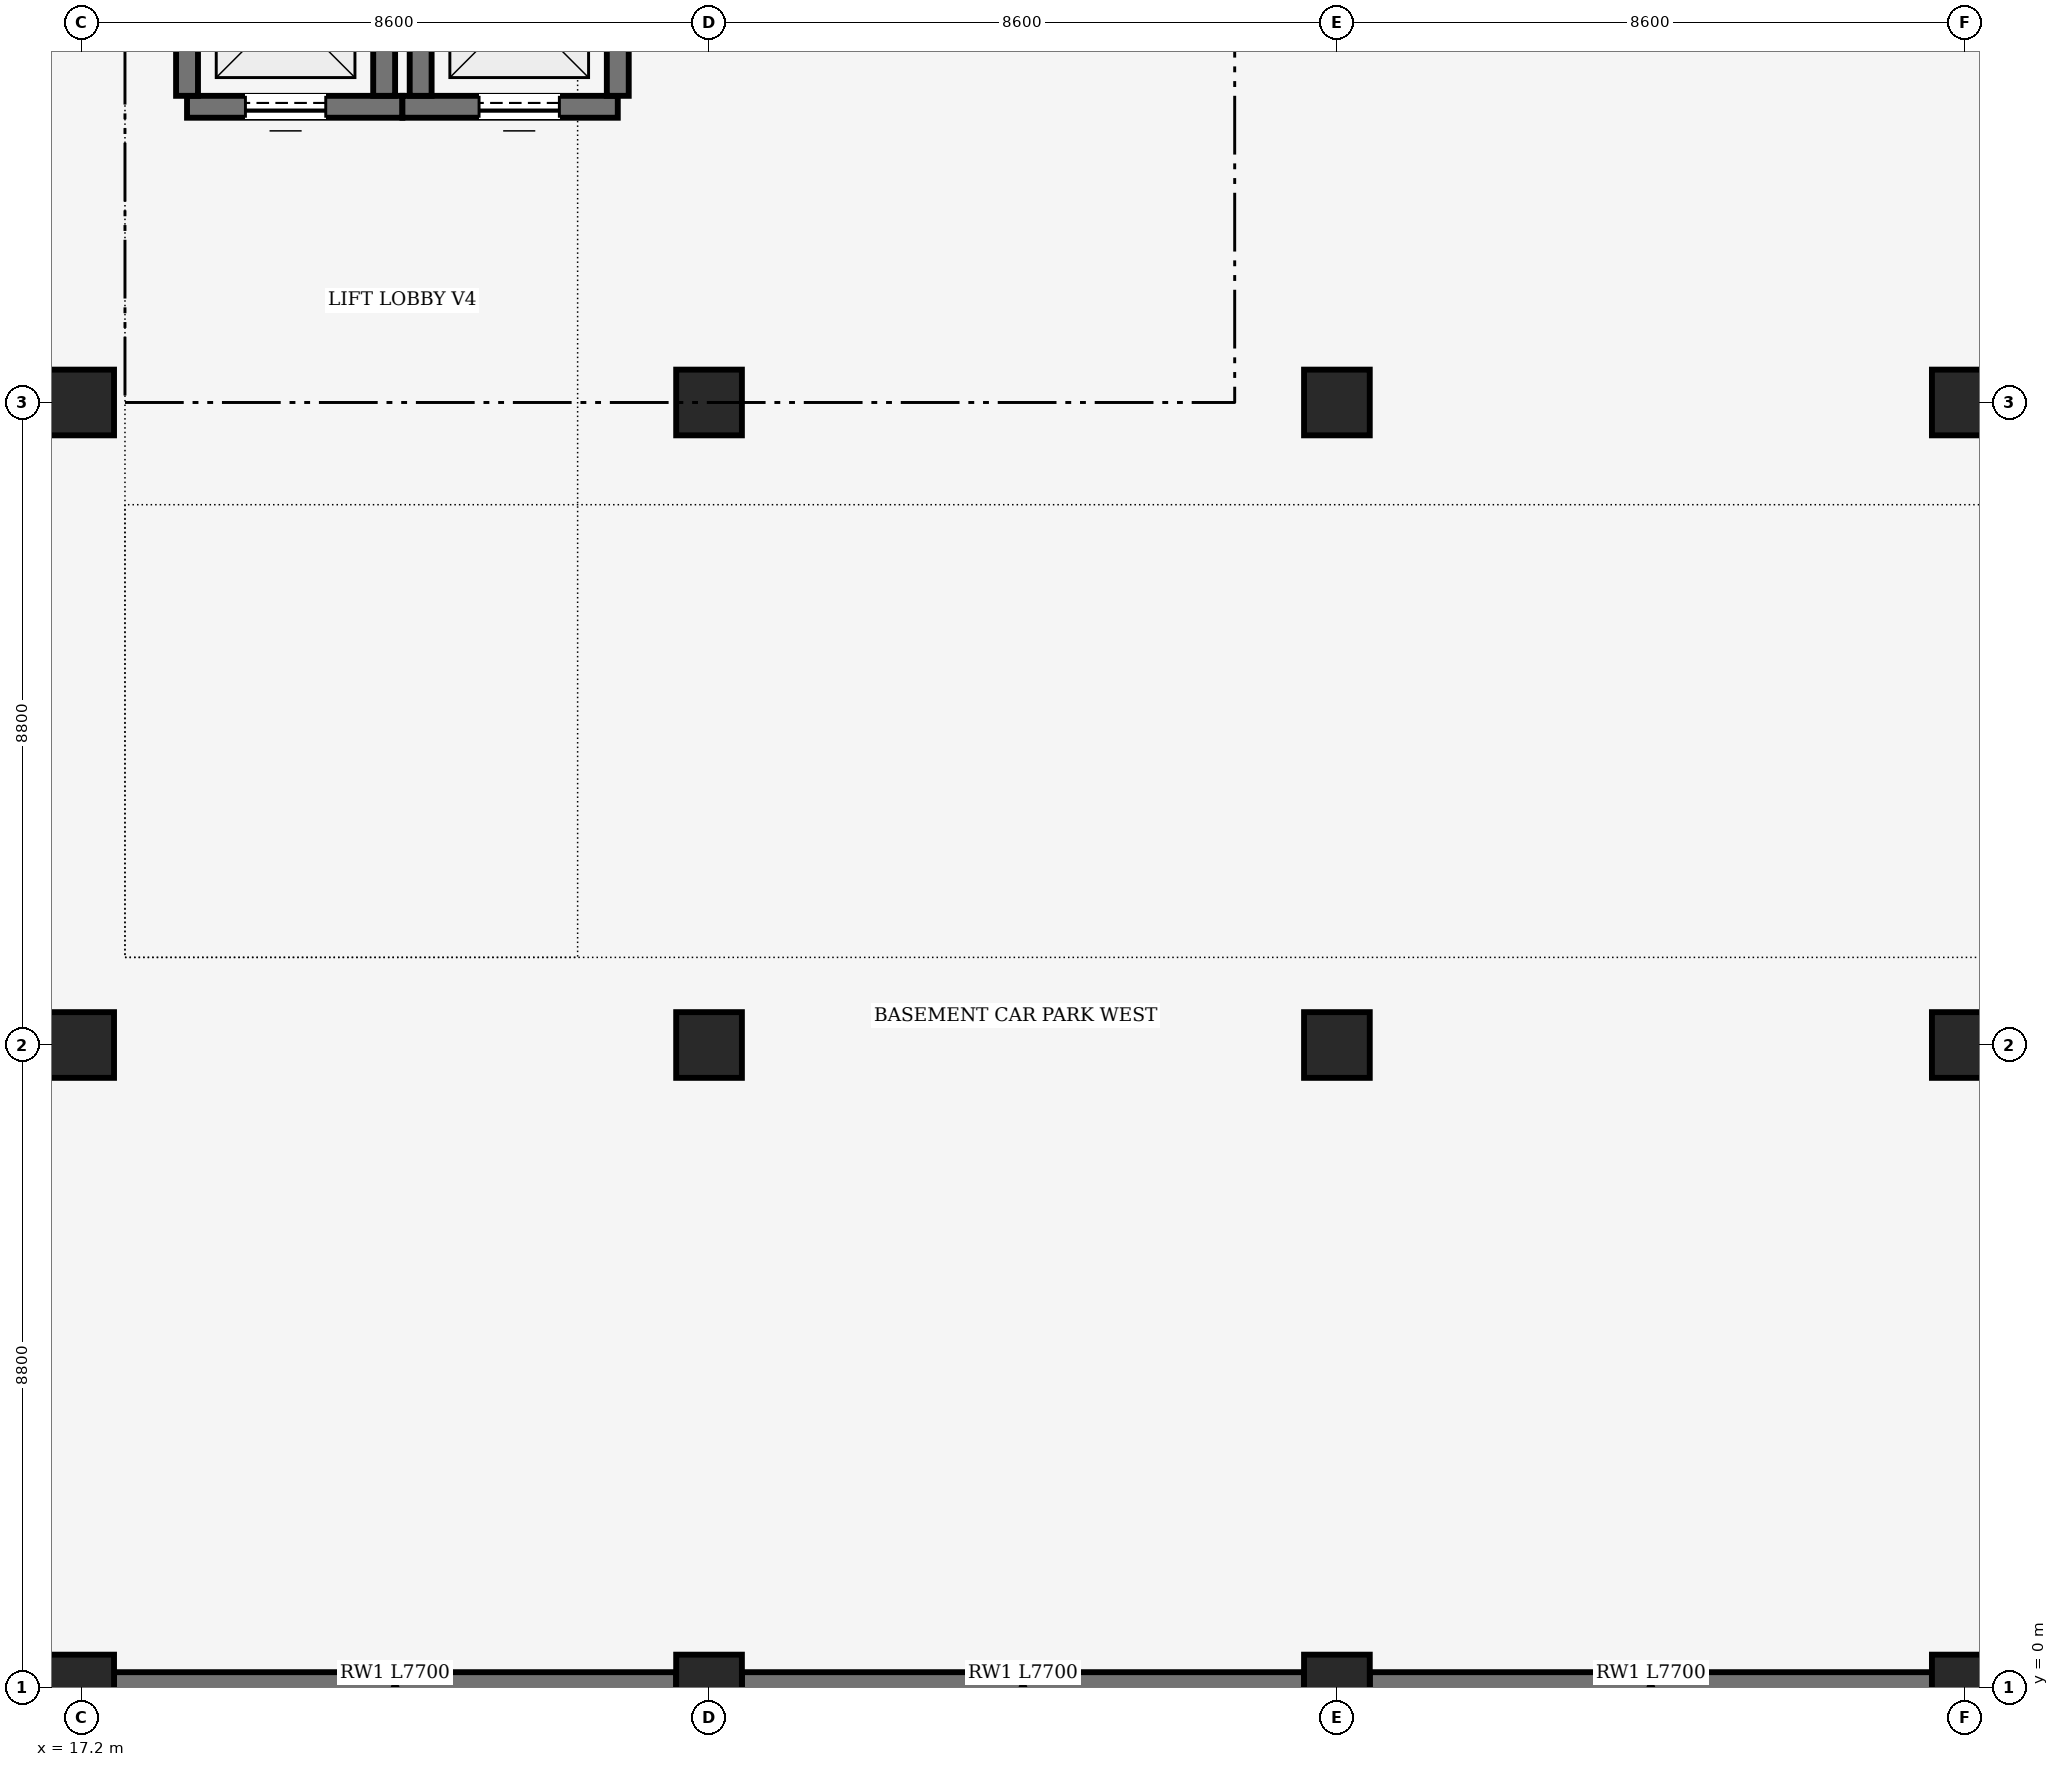
"""IFC4 building model, lengths in metres.
Left out: names, types, materials, properties, quantities, classifications, styles, units other than length and angle.
Written with IfcOpenShell. Run it as: python <this file> out.ifc"""

import sys

from ifc_helpers import new_model, si_unit, direction, frame, frame_2d, origin, origin_2d, place, context, subcontext, project, spatial, rectangle, extrude, element, fill, save


model = new_model("IFC4")
c1 = context("Model", 3, precision=1e-05, world=origin(), true_north=direction((0.0, 1.0)))
c2 = subcontext(c1, "Body", "Model", "MODEL_VIEW")
j1 = project(units=[si_unit("LENGTHUNIT", "METRE"), si_unit("PLANEANGLEUNIT", "RADIAN")], contexts=[c1])
p1 = place(None, origin())
s1 = spatial("IfcSite", under=j1, at=p1, CompositionType="ELEMENT")
p2 = place(p1, origin())
s2 = spatial("IfcBuilding", under=s1, at=p2, CompositionType="ELEMENT")
p3 = place(p2, frame((0.0, 0.0, -4.2)))
s3 = spatial("IfcBuildingStorey", under=s2, at=p3, CompositionType="ELEMENT", Elevation=-4.2)
for number, where, z_axis, x_axis in (
    (1, (17.2, 0.0, 0.0), (0.0, 0.0, 1.0), (1.0, 0.0, 0.0)),
    (2, (17.2, 8.8, 0.0), (0.0, 0.0, 1.0), (1.0, 0.0, 0.0)),
    (3, (17.2, 17.6, 0.0), (0.0, 0.0, 1.0), (1.0, 0.0, 0.0)),
    (4, (25.8, 0.0, 0.0), (0.0, 0.0, 1.0), (1.0, 0.0, 0.0)),
    (5, (25.8, 8.8, 0.0), (0.0, 0.0, 1.0), (1.0, 0.0, 0.0)),
    (6, (25.8, 17.6, 0.0), (0.0, 0.0, 1.0), (1.0, 0.0, 0.0)),
    (7, (34.4, 0.0, 0.0), (0.0, 0.0, 1.0), (1.0, 0.0, 0.0)),
    (8, (34.4, 8.8, 0.0), (0.0, 0.0, 1.0), (1.0, 0.0, 0.0)),
    (9, (34.4, 17.6, 0.0), (0.0, 0.0, 1.0), (1.0, 0.0, 0.0)),
    (10, (43.0, 0.0, 0.0), (0.0, 0.0, 1.0), (1.0, 0.0, 0.0)),
    (11, (43.0, 8.8, 0.0), (0.0, 0.0, 1.0), (1.0, 0.0, 0.0)),
    (12, (43.0, 17.6, 0.0), (0.0, 0.0, 1.0), (1.0, 0.0, 0.0)),
):
    element("IfcColumn", number, at=place(p3, frame(where, z_axis=z_axis, x_axis=x_axis)), inside=s3, PredefinedType="COLUMN", context=c2, shape_type="SweptSolid", body=[
        extrude(rectangle(XDim=0.9, YDim=0.9, at=origin_2d()), origin(), (0.0, 0.0, 1.0), 3.92),
    ])
for number, where, z_axis, x_axis in (
    (13, (42.55, 0.0, 0.0), (0.0, 0.0, 1.0), (-1.0, 0.0, 0.0)),
    (14, (33.95, 0.0, 0.0), (0.0, 0.0, 1.0), (-1.0, 0.0, 0.0)),
):
    element("IfcWall", number, at=place(p3, frame(where, z_axis=z_axis, x_axis=x_axis)), inside=s3, PredefinedType="USERDEFINED", context=c2, shape_type="SweptSolid", body=[
        extrude(rectangle(XDim=7.7, YDim=0.42, at=frame_2d((3.85, 0.0))), origin(), (0.0, 0.0, 1.0), 3.27),
    ])
p4 = place(p3, frame((25.35, 0.0, 0.0), z_axis=(0.0, 0.0, 1.0), x_axis=(-1.0, 0.0, 0.0)))
e15 = element("IfcWall", 15, at=p4, inside=s3, PredefinedType="USERDEFINED", context=c2, shape_type="SweptSolid", body=[
    extrude(rectangle(XDim=7.7, YDim=0.42, at=frame_2d((3.85, 0.0))), origin(), (0.0, 0.0, 1.0), 3.27),
])
p5 = place(p3, frame((21.6, 21.65, 0.0), z_axis=(0.0, 0.0, 1.0), x_axis=(-1.0, 0.0, 0.0)))
e16 = element("IfcWall", 16, at=p5, inside=s3, PredefinedType="SHEAR", context=c2, shape_type="SweptSolid", body=[
    extrude(rectangle(XDim=2.95, YDim=0.3, at=frame_2d((1.475, 0.0))), origin(), (0.0, 0.0, 1.0), 3.92),
])
p6 = place(p5, frame((1.05, 0.0, 0.0)))
e17 = element("IfcOpeningElement", 17, at=p6, cuts=e16, PredefinedType="OPENING", context=c2, shape_type="SweptSolid", body=[
    extrude(rectangle(XDim=1.1, YDim=2.1, at=frame_2d((0.55, 1.05))), frame((0.0, 0.15, 0.0), z_axis=(0.0, -1.0, 0.0), x_axis=(1.0, 0.0, 0.0)), (0.0, 0.0, 1.0), 0.3),
])
for number, where, z_axis, x_axis in (
    (18, (18.65, 21.8, 0.0), (0.0, 0.0, 1.0), (0.0, 1.0, 0.0)),
    (19, (21.35, 24.2, 0.0), (0.0, 0.0, 1.0), (0.0, -1.0, 0.0)),
):
    element("IfcWall", number, at=place(p3, frame(where, z_axis=z_axis, x_axis=x_axis)), inside=s3, PredefinedType="SHEAR", context=c2, shape_type="SweptSolid", body=[
        extrude(rectangle(XDim=2.4, YDim=0.3, at=frame_2d((1.2, 0.0))), origin(), (0.0, 0.0, 1.0), 3.92),
    ])
p7 = place(p3, frame((24.55, 21.65, 0.0), z_axis=(0.0, 0.0, 1.0), x_axis=(-1.0, 0.0, 0.0)))
e20 = element("IfcWall", 20, at=p7, inside=s3, PredefinedType="SHEAR", context=c2, shape_type="SweptSolid", body=[
    extrude(rectangle(XDim=2.95, YDim=0.3, at=frame_2d((1.475, 0.0))), origin(), (0.0, 0.0, 1.0), 3.92),
])
p8 = place(p7, frame((0.8, 0.0, 0.0)))
e21 = element("IfcOpeningElement", 21, at=p8, cuts=e20, PredefinedType="OPENING", context=c2, shape_type="SweptSolid", body=[
    extrude(rectangle(XDim=1.1, YDim=2.1, at=frame_2d((0.55, 1.05))), frame((0.0, 0.15, 0.0), z_axis=(0.0, -1.0, 0.0), x_axis=(1.0, 0.0, 0.0)), (0.0, 0.0, 1.0), 0.3),
])
for number, where, z_axis, x_axis in (
    (22, (21.85, 21.8, 0.0), (0.0, 0.0, 1.0), (0.0, 1.0, 0.0)),
    (23, (24.55, 24.2, 0.0), (0.0, 0.0, 1.0), (0.0, -1.0, 0.0)),
):
    element("IfcWall", number, at=place(p3, frame(where, z_axis=z_axis, x_axis=x_axis)), inside=s3, PredefinedType="SHEAR", context=c2, shape_type="SweptSolid", body=[
        extrude(rectangle(XDim=2.4, YDim=0.3, at=frame_2d((1.2, 0.0))), origin(), (0.0, 0.0, 1.0), 3.92),
    ])
p9 = place(p6, origin())
e24 = element("IfcDoor", 24, at=p9, inside=s3, OperationType="SLIDING_TO_LEFT", PredefinedType="DOOR", context=c2, shape_type="SweptSolid", body=[
    extrude(rectangle(XDim=1.1, YDim=2.1, at=frame_2d((0.55, 1.05))), frame((0.0, 0.025, 0.0), z_axis=(0.0, -1.0, 0.0), x_axis=(1.0, 0.0, 0.0)), (0.0, 0.0, 1.0), 0.05),
])
fill(e17, e24)
p10 = place(p8, origin())
e25 = element("IfcDoor", 25, at=p10, inside=s3, OperationType="SLIDING_TO_LEFT", PredefinedType="DOOR", context=c2, shape_type="SweptSolid", body=[
    extrude(rectangle(XDim=1.1, YDim=2.1, at=frame_2d((0.55, 1.05))), frame((0.0, 0.025, 0.0), z_axis=(0.0, -1.0, 0.0), x_axis=(1.0, 0.0, 0.0)), (0.0, 0.0, 1.0), 0.05),
])
fill(e21, e25)
save(model, sys.argv[1])
